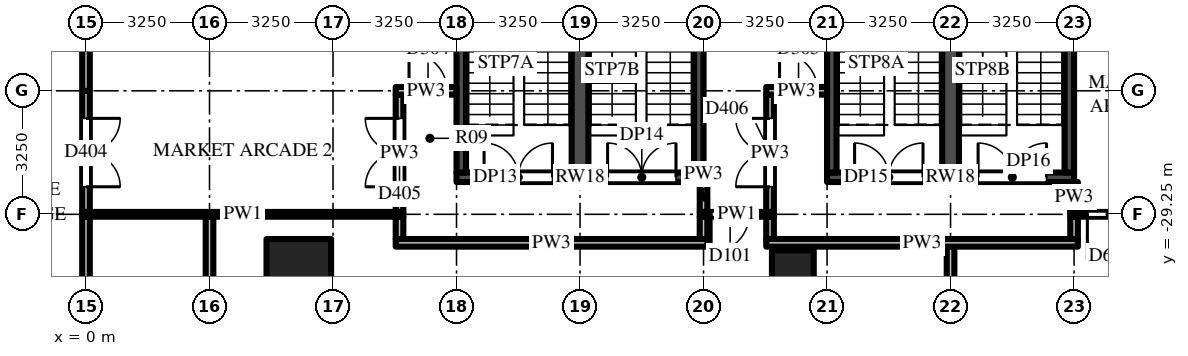
"""IFC4 building model, lengths in metres.
Left out: names, types, materials, properties, quantities, classifications, styles, units other than length and angle.
Written with IfcOpenShell. Run it as: python <this file> out.ifc"""

import sys

from ifc_helpers import new_model, si_unit, direction, frame, frame_2d, origin, origin_2d, place, context, subcontext, project, spatial, rectangle, extrude, source, transform, mapped, element, fill, save


model = new_model("IFC4")
c1 = context("Model", 3, precision=1e-05, world=origin(), true_north=direction((0.0, 1.0)))
c2 = subcontext(c1, "Body", "Model", "MODEL_VIEW")
j1 = project(units=[si_unit("LENGTHUNIT", "METRE"), si_unit("PLANEANGLEUNIT", "RADIAN")], contexts=[c1])
p1 = place(None, origin())
s1 = spatial("IfcSite", under=j1, at=p1, CompositionType="ELEMENT")
p2 = place(p1, origin())
s2 = spatial("IfcBuilding", under=s1, at=p2, CompositionType="ELEMENT")
p3 = place(p2, frame((0.0, 0.0, 14.0)))
s3 = spatial("IfcBuildingStorey", under=s2, at=p3, CompositionType="ELEMENT", Elevation=14.0)
m1 = source(origin(), c2, "Body", "SweptSolid", [
    extrude(rectangle(XDim=1.7, YDim=1.7, at=origin_2d()), origin(), (0.0, 0.0, 1.0), 5.0),
])
p4 = place(p3, frame((5.6, -30.75, 0.0), z_axis=(0.0, 0.0, 1.0), x_axis=(1.0, 0.0, 0.0)))
e1 = element("IfcColumn", 1, at=p4, inside=s3, PredefinedType="COLUMN", context=c2, shape_type="MappedRepresentation", body=[
    mapped(m1, transform((0.0, 0.0, 0.0))),
])
m2 = source(origin(), c2, "Body", "SweptSolid", [
    extrude(rectangle(XDim=1.1, YDim=1.1, at=origin_2d()), origin(), (0.0, 0.0, 1.0), 5.0),
])
p5 = place(p3, frame((18.6, -30.75, 0.0), z_axis=(0.0, 0.0, 1.0), x_axis=(1.0, 0.0, 0.0)))
e2 = element("IfcColumn", 2, at=p5, inside=s3, PredefinedType="COLUMN", context=c2, shape_type="MappedRepresentation", body=[
    mapped(m2, transform((0.0, 0.0, 0.0))),
])
m3 = source(origin(), c2, "Body", "SweptSolid", [
    extrude(rectangle(XDim=6.5, YDim=0.25, at=frame_2d((3.25, 0.0))), origin(), (0.0, 0.0, 1.0), 4.7),
])
p6 = place(p3, frame((9.75, -28.275, 0.0), z_axis=(0.0, 0.0, 1.0), x_axis=(1.0, 0.0, 0.0)))
e3 = element("IfcWall", 3, at=p6, inside=s3, PredefinedType="SHEAR", context=c2, shape_type="MappedRepresentation", body=[
    mapped(m3, transform((0.0, 0.0, 0.0))),
])
m4 = source(origin(), c2, "Body", "SweptSolid", [
    extrude(rectangle(XDim=1.8, YDim=2.1, at=frame_2d((0.9, 1.05))), frame((0.0, 0.135, 0.0), z_axis=(0.0, -1.0, 0.0), x_axis=(1.0, 0.0, 0.0)), (0.0, 0.0, 1.0), 0.27),
])
p7 = place(p6, frame((0.725, 0.0, 0.0)))
e4 = element("IfcOpeningElement", 4, at=p7, cuts=e3, PredefinedType="OPENING", context=c2, shape_type="MappedRepresentation", body=[
    mapped(m4, transform((0.0, 0.0, 0.0))),
])
p8 = place(p6, frame((3.975, 0.0, 0.0)))
e5 = element("IfcOpeningElement", 5, at=p8, cuts=e3, PredefinedType="OPENING", context=c2, shape_type="MappedRepresentation", body=[
    mapped(m4, transform((0.0, 0.0, 0.0))),
])
m5 = source(origin(), c2, "Body", "SweptSolid", [
    extrude(rectangle(XDim=8.3, YDim=0.25, at=frame_2d((4.15, 0.0))), origin(), (0.0, 0.0, 1.0), 4.7),
])
for number, where, z_axis, x_axis in (
    (6, (9.875, -28.15, 0.0), (0.0, 0.0, 1.0), (0.0, 1.0, 0.0)),
    (7, (16.125, -28.15, 0.0), (0.0, 0.0, 1.0), (0.0, 1.0, 0.0)),
):
    element("IfcWall", number, at=place(p3, frame(where, z_axis=z_axis, x_axis=x_axis)), inside=s3, PredefinedType="SHEAR", context=c2, shape_type="MappedRepresentation", body=[
        mapped(m5, transform((0.0, 0.0, 0.0))),
    ])
m6 = source(origin(), c2, "Body", "SweptSolid", [
    extrude(rectangle(XDim=8.3, YDim=0.44, at=frame_2d((4.15, 0.0))), origin(), (0.0, 0.0, 1.0), 4.7),
])
p9 = place(p3, frame((13.0, -28.15, 0.0), z_axis=(0.0, 0.0, 1.0), x_axis=(0.0, 1.0, 0.0)))
e8 = element("IfcWall", 8, at=p9, inside=s3, PredefinedType="SHEAR", context=c2, shape_type="MappedRepresentation", body=[
    mapped(m6, transform((0.0, 0.0, 0.0))),
])
p10 = place(p3, frame((19.5, -28.275, 0.0), z_axis=(0.0, 0.0, 1.0), x_axis=(1.0, 0.0, 0.0)))
e9 = element("IfcWall", 9, at=p10, inside=s3, PredefinedType="SHEAR", context=c2, shape_type="MappedRepresentation", body=[
    mapped(m3, transform((0.0, 0.0, 0.0))),
])
p11 = place(p10, frame((0.725, 0.0, 0.0)))
e10 = element("IfcOpeningElement", 10, at=p11, cuts=e9, PredefinedType="OPENING", context=c2, shape_type="MappedRepresentation", body=[
    mapped(m4, transform((0.0, 0.0, 0.0))),
])
p12 = place(p10, frame((3.975, 0.0, 0.0)))
e11 = element("IfcOpeningElement", 11, at=p12, cuts=e9, PredefinedType="OPENING", context=c2, shape_type="MappedRepresentation", body=[
    mapped(m4, transform((0.0, 0.0, 0.0))),
])
for number, where, z_axis, x_axis in (
    (12, (19.625, -28.15, 0.0), (0.0, 0.0, 1.0), (0.0, 1.0, 0.0)),
    (13, (25.875, -28.15, 0.0), (0.0, 0.0, 1.0), (0.0, 1.0, 0.0)),
):
    element("IfcWall", number, at=place(p3, frame(where, z_axis=z_axis, x_axis=x_axis)), inside=s3, PredefinedType="SHEAR", context=c2, shape_type="MappedRepresentation", body=[
        mapped(m5, transform((0.0, 0.0, 0.0))),
    ])
p13 = place(p3, frame((22.75, -28.15, 0.0), z_axis=(0.0, 0.0, 1.0), x_axis=(0.0, 1.0, 0.0)))
e14 = element("IfcWall", 14, at=p13, inside=s3, PredefinedType="SHEAR", context=c2, shape_type="MappedRepresentation", body=[
    mapped(m6, transform((0.0, 0.0, 0.0))),
])
m7 = source(origin(), c2, "Body", "SweptSolid", [
    extrude(rectangle(XDim=3.188, YDim=0.2, at=frame_2d((1.594, 0.0))), origin(), (0.0, 0.0, 1.0), 3.996),
])
p14 = place(p3, frame((0.0, -26.0, 0.0), z_axis=(0.0, 0.0, 1.0), x_axis=(0.0, -1.0, 0.0)))
e15 = element("IfcWall", 15, at=p14, inside=s3, PredefinedType="PARTITIONING", context=c2, shape_type="MappedRepresentation", body=[
    mapped(m7, transform((0.0, 0.0, 0.0))),
])
m8 = source(origin(), c2, "Body", "SweptSolid", [
    extrude(rectangle(XDim=1.8, YDim=2.1, at=frame_2d((0.9, 1.05))), frame((0.0, 0.11, 0.0), z_axis=(0.0, -1.0, 0.0), x_axis=(1.0, 0.0, 0.0)), (0.0, 0.0, 1.0), 0.22),
])
p15 = place(p14, frame((0.725, 0.0, 0.0)))
e16 = element("IfcOpeningElement", 16, at=p15, cuts=e15, PredefinedType="OPENING", context=c2, shape_type="MappedRepresentation", body=[
    mapped(m8, transform((0.0, 0.0, 0.0))),
])
m9 = source(origin(), c2, "Body", "SweptSolid", [
    extrude(rectangle(XDim=9.488, YDim=0.2, at=frame_2d((4.744, 0.0))), origin(), (0.0, 0.0, 1.0), 3.918),
])
p16 = place(p3, frame((0.0, -29.312, 0.0), z_axis=(0.0, 0.0, 1.0), x_axis=(0.0, -1.0, 0.0)))
e17 = element("IfcWall", 17, at=p16, inside=s3, PredefinedType="PARTITIONING", context=c2, shape_type="MappedRepresentation", body=[
    mapped(m9, transform((0.0, 0.0, 0.0))),
])
m10 = source(origin(), c2, "Body", "SweptSolid", [
    extrude(rectangle(XDim=1.0, YDim=2.1, at=frame_2d((0.5, 1.05))), frame((0.0, 0.11, 0.0), z_axis=(0.0, -1.0, 0.0), x_axis=(1.0, 0.0, 0.0)), (0.0, 0.0, 1.0), 0.22),
])
p17 = place(p16, frame((8.337, 0.0, 0.0)))
e18 = element("IfcOpeningElement", 18, at=p17, cuts=e17, PredefinedType="OPENING", context=c2, shape_type="MappedRepresentation", body=[
    mapped(m10, transform((0.0, 0.0, 0.0))),
])
m11 = source(origin(), c2, "Body", "SweptSolid", [
    extrude(rectangle(XDim=6.5, YDim=0.2, at=frame_2d((3.25, 0.0))), origin(), (0.0, 0.0, 1.0), 3.996),
])
p18 = place(p3, frame((0.0, -19.5, 0.0), z_axis=(0.0, 0.0, 1.0), x_axis=(0.0, -1.0, 0.0)))
e19 = element("IfcWall", 19, at=p18, inside=s3, PredefinedType="PARTITIONING", context=c2, shape_type="MappedRepresentation", body=[
    mapped(m11, transform((0.0, 0.0, 0.0))),
])
p19 = place(p3, frame((3.25, -38.8, 0.0), z_axis=(0.0, 0.0, 1.0), x_axis=(0.0, 1.0, 0.0)))
e20 = element("IfcWall", 20, at=p19, inside=s3, PredefinedType="PARTITIONING", context=c2, shape_type="MappedRepresentation", body=[
    mapped(m9, transform((0.0, 0.0, 0.0))),
])
m12 = source(origin(), c2, "Body", "SweptSolid", [
    extrude(rectangle(XDim=3.087, YDim=0.2, at=frame_2d((1.544, 0.0))), origin(), (0.0, 0.0, 1.0), 4.274),
])
p20 = place(p3, frame((8.25, -29.188, 0.0), z_axis=(0.0, 0.0, 1.0), x_axis=(0.0, 1.0, 0.0)))
e21 = element("IfcWall", 21, at=p20, inside=s3, PredefinedType="PARTITIONING", context=c2, shape_type="MappedRepresentation", body=[
    mapped(m12, transform((0.0, 0.0, 0.0))),
])
p21 = place(p20, frame((0.663, 0.0, 0.0)))
e22 = element("IfcOpeningElement", 22, at=p21, cuts=e21, PredefinedType="OPENING", context=c2, shape_type="MappedRepresentation", body=[
    mapped(m8, transform((0.0, 0.0, 0.0))),
])
m13 = source(origin(), c2, "Body", "SweptSolid", [
    extrude(rectangle(XDim=0.587, YDim=0.2, at=frame_2d((0.294, 0.0))), origin(), (0.0, 0.0, 1.0), 4.7),
])
p22 = place(p3, frame((8.25, -29.312, 0.0), z_axis=(0.0, 0.0, 1.0), x_axis=(0.0, -1.0, 0.0)))
e23 = element("IfcWall", 23, at=p22, inside=s3, PredefinedType="PARTITIONING", context=c2, shape_type="MappedRepresentation", body=[
    mapped(m13, transform((0.0, 0.0, 0.0))),
])
m14 = source(origin(), c2, "Body", "SweptSolid", [
    extrude(rectangle(XDim=0.788, YDim=0.2, at=frame_2d((0.394, 0.0))), origin(), (0.0, 0.0, 1.0), 4.7),
])
p23 = place(p3, frame((16.25, -29.188, 0.0), z_axis=(0.0, 0.0, 1.0), x_axis=(0.0, 1.0, 0.0)))
e24 = element("IfcWall", 24, at=p23, inside=s3, PredefinedType="PARTITIONING", context=c2, shape_type="MappedRepresentation", body=[
    mapped(m14, transform((0.0, 0.0, 0.0))),
])
p24 = place(p3, frame((16.25, -29.9, 0.0), z_axis=(0.0, 0.0, 1.0), x_axis=(0.0, 1.0, 0.0)))
e25 = element("IfcWall", 25, at=p24, inside=s3, PredefinedType="PARTITIONING", context=c2, shape_type="MappedRepresentation", body=[
    mapped(m13, transform((0.0, 0.0, 0.0))),
])
p25 = place(p3, frame((18.0, -29.188, 0.0), z_axis=(0.0, 0.0, 1.0), x_axis=(0.0, 1.0, 0.0)))
e26 = element("IfcWall", 26, at=p25, inside=s3, PredefinedType="PARTITIONING", context=c2, shape_type="MappedRepresentation", body=[
    mapped(m12, transform((0.0, 0.0, 0.0))),
])
p26 = place(p25, frame((0.663, 0.0, 0.0)))
e27 = element("IfcOpeningElement", 27, at=p26, cuts=e26, PredefinedType="OPENING", context=c2, shape_type="MappedRepresentation", body=[
    mapped(m8, transform((0.0, 0.0, 0.0))),
])
p27 = place(p3, frame((18.0, -29.9, 0.0), z_axis=(0.0, 0.0, 1.0), x_axis=(0.0, 1.0, 0.0)))
e28 = element("IfcWall", 28, at=p27, inside=s3, PredefinedType="PARTITIONING", context=c2, shape_type="MappedRepresentation", body=[
    mapped(m13, transform((0.0, 0.0, 0.0))),
])
m15 = source(origin(), c2, "Body", "SweptSolid", [
    extrude(rectangle(XDim=8.7, YDim=0.2, at=frame_2d((4.35, 0.0))), origin(), (0.0, 0.0, 1.0), 3.762),
])
p28 = place(p3, frame((22.75, -38.8, 0.0), z_axis=(0.0, 0.0, 1.0), x_axis=(0.0, 1.0, 0.0)))
e29 = element("IfcWall", 29, at=p28, inside=s3, PredefinedType="PARTITIONING", context=c2, shape_type="MappedRepresentation", body=[
    mapped(m15, transform((0.0, 0.0, 0.0))),
])
p29 = place(p3, frame((26.0, -29.188, 0.0), z_axis=(0.0, 0.0, 1.0), x_axis=(0.0, 1.0, 0.0)))
e30 = element("IfcWall", 30, at=p29, inside=s3, PredefinedType="PARTITIONING", context=c2, shape_type="MappedRepresentation", body=[
    mapped(m14, transform((0.0, 0.0, 0.0))),
])
p30 = place(p3, frame((26.0, -29.312, 0.0), z_axis=(0.0, 0.0, 1.0), x_axis=(0.0, -1.0, 0.0)))
e31 = element("IfcWall", 31, at=p30, inside=s3, PredefinedType="PARTITIONING", context=c2, shape_type="MappedRepresentation", body=[
    mapped(m13, transform((0.0, 0.0, 0.0))),
])
m16 = source(origin(), c2, "Body", "SweptSolid", [
    extrude(rectangle(XDim=8.2, YDim=0.2, at=frame_2d((4.1, 0.0))), origin(), (0.0, 0.0, 1.0), 4.7),
])
p31 = place(p3, frame((16.35, -30.0, 0.0), z_axis=(0.0, 0.0, 1.0), x_axis=(-1.0, 0.0, 0.0)))
e32 = element("IfcWall", 32, at=p31, inside=s3, PredefinedType="PARTITIONING", context=c2, shape_type="MappedRepresentation", body=[
    mapped(m16, transform((0.0, 0.0, 0.0))),
])
m17 = source(origin(), c2, "Body", "SweptSolid", [
    extrude(rectangle(XDim=8.2, YDim=0.2, at=frame_2d((4.1, 0.0))), origin(), (0.0, 0.0, 1.0), 3.762),
])
p32 = place(p3, frame((26.1, -30.0, 0.0), z_axis=(0.0, 0.0, 1.0), x_axis=(-1.0, 0.0, 0.0)))
e33 = element("IfcWall", 33, at=p32, inside=s3, PredefinedType="PARTITIONING", context=c2, shape_type="MappedRepresentation", body=[
    mapped(m17, transform((0.0, 0.0, 0.0))),
])
p33 = place(p3, frame((8.35, -29.25, 0.0), z_axis=(0.0, 0.0, 1.0), x_axis=(-1.0, 0.0, 0.0)))
e34 = element("IfcWall", 34, at=p33, inside=s3, PredefinedType="PARTITIONING", context=c2, shape_type="SweptSolid", body=[
    extrude(rectangle(XDim=8.45, YDim=0.125, at=frame_2d((4.225, 0.0))), origin(), (0.0, 0.0, 1.0), 3.918),
])
m18 = source(origin(), c2, "Body", "SweptSolid", [
    extrude(rectangle(XDim=1.95, YDim=0.125, at=frame_2d((0.975, 0.0))), origin(), (0.0, 0.0, 1.0), 4.7),
])
p34 = place(p3, frame((18.1, -29.25, 0.0), z_axis=(0.0, 0.0, 1.0), x_axis=(-1.0, 0.0, 0.0)))
e35 = element("IfcWall", 35, at=p34, inside=s3, PredefinedType="PARTITIONING", context=c2, shape_type="MappedRepresentation", body=[
    mapped(m18, transform((0.0, 0.0, 0.0))),
])
m19 = source(origin(), c2, "Body", "SweptSolid", [
    extrude(rectangle(XDim=1.0, YDim=2.1, at=frame_2d((0.5, 1.05))), frame((0.0, 0.073, 0.0), z_axis=(0.0, -1.0, 0.0), x_axis=(1.0, 0.0, 0.0)), (0.0, 0.0, 1.0), 0.145),
])
p35 = place(p34, frame((0.65, 0.0, 0.0)))
e36 = element("IfcOpeningElement", 36, at=p35, cuts=e35, PredefinedType="OPENING", context=c2, shape_type="MappedRepresentation", body=[
    mapped(m19, transform((0.0, 0.0, 0.0))),
])
m20 = source(origin(), c2, "Body", "SweptSolid", [
    extrude(rectangle(XDim=3.413, YDim=0.125, at=frame_2d((1.706, 0.0))), origin(), (0.0, 0.0, 1.0), 4.7),
])
p36 = place(p3, frame((29.312, -29.25, 0.0), z_axis=(0.0, 0.0, 1.0), x_axis=(-1.0, 0.0, 0.0)))
e37 = element("IfcWall", 37, at=p36, inside=s3, PredefinedType="PARTITIONING", context=c2, shape_type="MappedRepresentation", body=[
    mapped(m20, transform((0.0, 0.0, 0.0))),
])
m21 = source(origin(), c2, "Body", "SweptSolid", [
    extrude(rectangle(XDim=1.2, YDim=2.1, at=frame_2d((0.6, 1.05))), frame((0.0, 0.073, 0.0), z_axis=(0.0, -1.0, 0.0), x_axis=(1.0, 0.0, 0.0)), (0.0, 0.0, 1.0), 0.145),
])
p37 = place(p36, frame((1.762, 0.0, 0.0)))
e38 = element("IfcOpeningElement", 38, at=p37, cuts=e37, PredefinedType="OPENING", context=c2, shape_type="MappedRepresentation", body=[
    mapped(m21, transform((0.0, 0.0, 0.0))),
])
m22 = source(origin(), c2, "Body", "SweptSolid", [
    extrude(rectangle(XDim=1.6, YDim=0.2, at=frame_2d((0.8, 0.0))), origin(), (0.0, 0.0, 1.0), 4.7),
])
p38 = place(p3, frame((8.15, -26.0, 0.0), z_axis=(0.0, 0.0, 1.0), x_axis=(1.0, 0.0, 0.0)))
e39 = element("IfcWall", 39, at=p38, inside=s3, PredefinedType="PARTITIONING", context=c2, shape_type="MappedRepresentation", body=[
    mapped(m22, transform((0.0, 0.0, 0.0))),
])
p39 = place(p38, frame((0.35, 0.0, 0.0)))
e40 = element("IfcOpeningElement", 40, at=p39, cuts=e39, PredefinedType="OPENING", context=c2, shape_type="MappedRepresentation", body=[
    mapped(m10, transform((0.0, 0.0, 0.0))),
])
m23 = source(origin(), c2, "Body", "SweptSolid", [
    extrude(rectangle(XDim=1.6, YDim=0.2, at=frame_2d((0.8, 0.0))), origin(), (0.0, 0.0, 1.0), 3.762),
])
p40 = place(p3, frame((17.9, -26.0, 0.0), z_axis=(0.0, 0.0, 1.0), x_axis=(1.0, 0.0, 0.0)))
e41 = element("IfcWall", 41, at=p40, inside=s3, PredefinedType="PARTITIONING", context=c2, shape_type="MappedRepresentation", body=[
    mapped(m23, transform((0.0, 0.0, 0.0))),
])
p41 = place(p40, frame((0.35, 0.0, 0.0)))
e42 = element("IfcOpeningElement", 42, at=p41, cuts=e41, PredefinedType="OPENING", context=c2, shape_type="MappedRepresentation", body=[
    mapped(m10, transform((0.0, 0.0, 0.0))),
])
m24 = source(origin(), c2, "Body", "SweptSolid", [
    extrude(rectangle(XDim=1.8, YDim=2.1, at=frame_2d((0.9, 1.05))), frame((0.0, 0.025, 0.0), z_axis=(0.0, -1.0, 0.0), x_axis=(1.0, 0.0, 0.0)), (0.0, 0.0, 1.0), 0.05),
])
p42 = place(p7, origin())
e43 = element("IfcDoor", 43, at=p42, inside=s3, OperationType="DOUBLE_DOOR_SINGLE_SWING", PredefinedType="DOOR", context=c2, shape_type="MappedRepresentation", body=[
    mapped(m24, transform((0.0, 0.0, 0.0))),
])
fill(e4, e43)
p43 = place(p8, origin())
e44 = element("IfcDoor", 44, at=p43, inside=s3, OperationType="DOUBLE_DOOR_SINGLE_SWING", PredefinedType="DOOR", context=c2, shape_type="MappedRepresentation", body=[
    mapped(m24, transform((0.0, 0.0, 0.0))),
])
fill(e5, e44)
p44 = place(p11, origin())
e45 = element("IfcDoor", 45, at=p44, inside=s3, OperationType="DOUBLE_DOOR_SINGLE_SWING", PredefinedType="DOOR", context=c2, shape_type="MappedRepresentation", body=[
    mapped(m24, transform((0.0, 0.0, 0.0))),
])
fill(e10, e45)
p45 = place(p12, origin())
e46 = element("IfcDoor", 46, at=p45, inside=s3, OperationType="DOUBLE_DOOR_SINGLE_SWING", PredefinedType="DOOR", context=c2, shape_type="MappedRepresentation", body=[
    mapped(m24, transform((0.0, 0.0, 0.0))),
])
fill(e11, e46)
m25 = source(origin(), c2, "Body", "SweptSolid", [
    extrude(rectangle(XDim=1.0, YDim=2.1, at=frame_2d((0.5, 1.05))), frame((0.0, 0.025, 0.0), z_axis=(0.0, -1.0, 0.0), x_axis=(1.0, 0.0, 0.0)), (0.0, 0.0, 1.0), 0.05),
])
p46 = place(p35, origin())
e47 = element("IfcDoor", 47, at=p46, inside=s3, OperationType="SINGLE_SWING_RIGHT", PredefinedType="DOOR", context=c2, shape_type="MappedRepresentation", body=[
    mapped(m25, transform((0.0, 0.0, 0.0))),
])
fill(e36, e47)
m26 = source(origin(), c2, "Body", "SweptSolid", [
    extrude(rectangle(XDim=1.2, YDim=2.1, at=frame_2d((0.6, 1.05))), frame((0.0, 0.025, 0.0), z_axis=(0.0, -1.0, 0.0), x_axis=(1.0, 0.0, 0.0)), (0.0, 0.0, 1.0), 0.05),
])
p47 = place(p37, origin())
e48 = element("IfcDoor", 48, at=p47, inside=s3, OperationType="SINGLE_SWING_RIGHT", PredefinedType="DOOR", context=c2, shape_type="MappedRepresentation", body=[
    mapped(m26, transform((0.0, 0.0, 0.0))),
])
fill(e38, e48)
p48 = place(p15, origin())
e49 = element("IfcDoor", 49, at=p48, inside=s3, OperationType="DOUBLE_DOOR_SINGLE_SWING", PredefinedType="DOOR", context=c2, shape_type="MappedRepresentation", body=[
    mapped(m24, transform((0.0, 0.0, 0.0))),
])
fill(e16, e49)
p49 = place(p21, origin())
e50 = element("IfcDoor", 50, at=p49, inside=s3, OperationType="DOUBLE_DOOR_SINGLE_SWING", PredefinedType="DOOR", context=c2, shape_type="MappedRepresentation", body=[
    mapped(m24, transform((0.0, 0.0, 0.0))),
])
fill(e22, e50)
p50 = place(p26, origin())
e51 = element("IfcDoor", 51, at=p50, inside=s3, OperationType="DOUBLE_DOOR_SINGLE_SWING", PredefinedType="DOOR", context=c2, shape_type="MappedRepresentation", body=[
    mapped(m24, transform((0.0, 0.0, 0.0))),
])
fill(e27, e51)
p51 = place(p39, origin())
e52 = element("IfcDoor", 52, at=p51, inside=s3, OperationType="SINGLE_SWING_LEFT", PredefinedType="DOOR", context=c2, shape_type="MappedRepresentation", body=[
    mapped(m25, transform((0.0, 0.0, 0.0))),
])
fill(e40, e52)
p52 = place(p41, origin())
e53 = element("IfcDoor", 53, at=p52, inside=s3, OperationType="SINGLE_SWING_LEFT", PredefinedType="DOOR", context=c2, shape_type="MappedRepresentation", body=[
    mapped(m25, transform((0.0, 0.0, 0.0))),
])
fill(e42, e53)
save(model, sys.argv[1])
